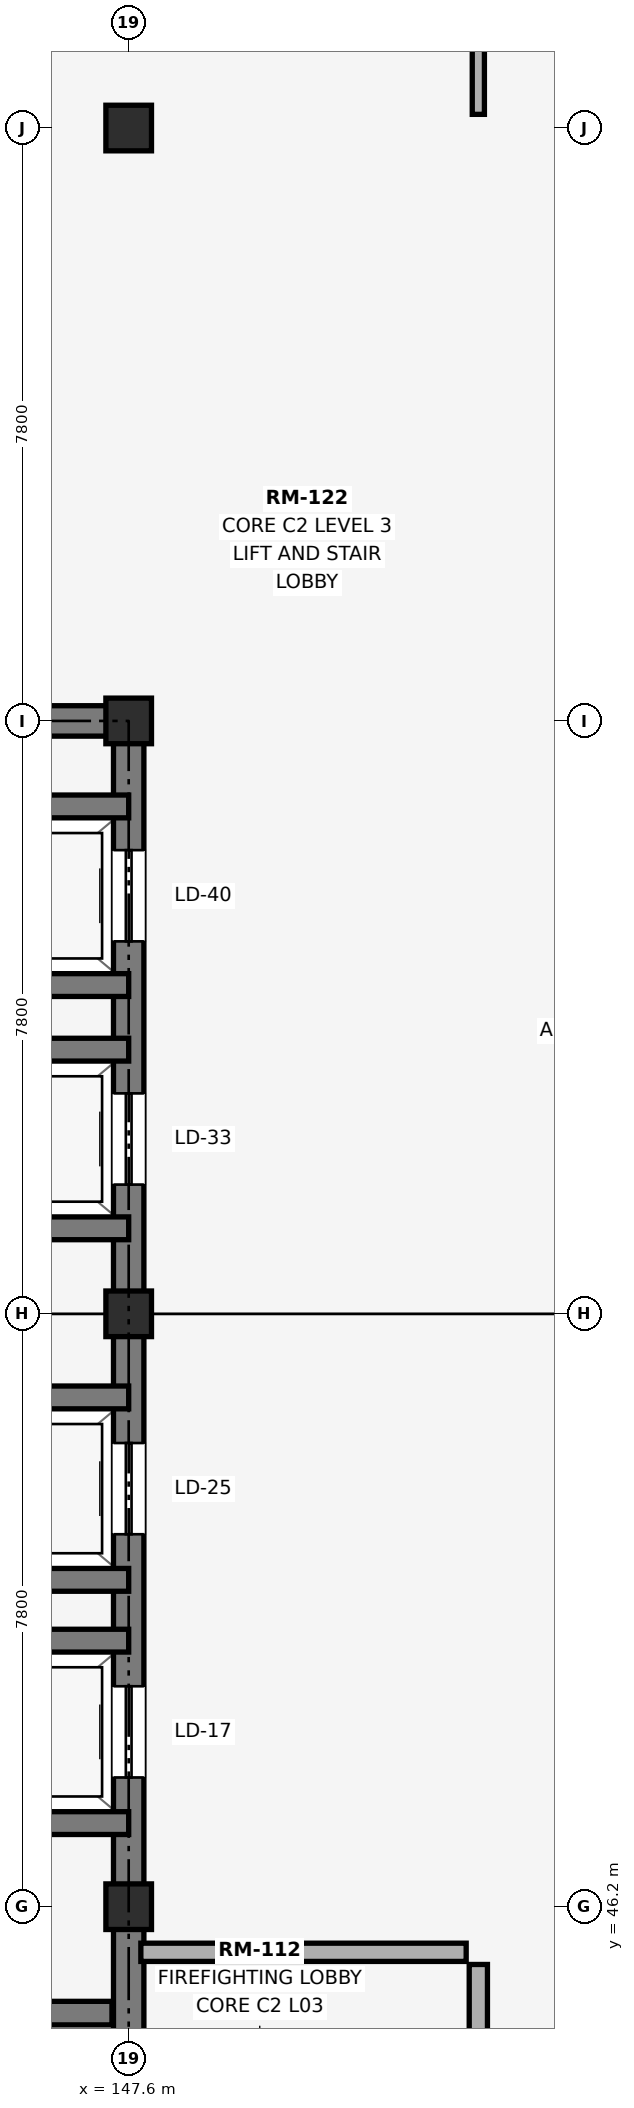
"""IFC4 building model, lengths in metres.
Left out: names, types, materials, properties, quantities, classifications, styles, units other than length and angle.
Written with IfcOpenShell. Run it as: python <this file> out.ifc"""

import sys

from ifc_helpers import new_model, si_unit, direction, frame, frame_2d, origin, origin_2d, place, context, subcontext, project, spatial, rectangle, extrude, element, fill, save


model = new_model("IFC4")
c1 = context("Model", 3, precision=1e-05, world=origin(), true_north=direction((0.0, 1.0)))
c2 = subcontext(c1, "Body", "Model", "MODEL_VIEW")
j1 = project(units=[si_unit("LENGTHUNIT", "METRE"), si_unit("PLANEANGLEUNIT", "RADIAN")], contexts=[c1])
p1 = place(None, origin())
s1 = spatial("IfcSite", under=j1, at=p1, CompositionType="ELEMENT")
p2 = place(p1, origin())
s2 = spatial("IfcBuilding", under=s1, at=p2, CompositionType="ELEMENT")
p3 = place(p2, frame((0.0, 0.0, 15.0)))
s3 = spatial("IfcBuildingStorey", under=s2, at=p3, CompositionType="ELEMENT", Elevation=15.0)
for number, where, z_axis, x_axis in (
    (1, (147.6, 46.2, 0.0), (0.0, 0.0, 1.0), (1.0, 0.0, 0.0)),
    (2, (147.6, 54.0, 0.0), (0.0, 0.0, 1.0), (1.0, 0.0, 0.0)),
    (3, (147.6, 61.8, 0.0), (0.0, 0.0, 1.0), (1.0, 0.0, 0.0)),
    (4, (147.6, 69.6, 0.0), (0.0, 0.0, 1.0), (1.0, 0.0, 0.0)),
):
    element("IfcColumn", number, at=place(p3, frame(where, z_axis=z_axis, x_axis=x_axis)), inside=s3, PredefinedType="COLUMN", context=c2, shape_type="SweptSolid", body=[
        extrude(rectangle(XDim=0.6, YDim=0.6, at=origin_2d()), origin(), (0.0, 0.0, 1.0), 4.5),
    ])
p4 = place(p3, frame((137.8, 61.8, 0.0), z_axis=(0.0, 0.0, 1.0), x_axis=(1.0, 0.0, 0.0)))
e5 = element("IfcWall", 5, at=p4, inside=s3, PredefinedType="SHEAR", context=c2, shape_type="SweptSolid", body=[
    extrude(rectangle(XDim=10.0, YDim=0.4, at=frame_2d((5.0, 0.0))), origin(), (0.0, 0.0, 1.0), 4.5),
])
p5 = place(p3, frame((147.6, 38.6, 0.0), z_axis=(0.0, 0.0, 1.0), x_axis=(0.0, 1.0, 0.0)))
e6 = element("IfcWall", 6, at=p5, inside=s3, PredefinedType="SHEAR", context=c2, shape_type="SweptSolid", body=[
    extrude(rectangle(XDim=23.0, YDim=0.4, at=frame_2d((11.5, 0.0))), origin(), (0.0, 0.0, 1.0), 4.5),
])
p6 = place(p5, frame((9.3, 0.0, 0.0)))
e7 = element("IfcOpeningElement", 7, at=p6, cuts=e6, PredefinedType="OPENING", context=c2, shape_type="SweptSolid", body=[
    extrude(rectangle(XDim=1.2, YDim=2.2, at=frame_2d((0.6, 1.1))), frame((0.0, 0.21, 0.0), z_axis=(0.0, -1.0, 0.0), x_axis=(1.0, 0.0, 0.0)), (0.0, 0.0, 1.0), 0.42),
])
p7 = place(p5, frame((12.5, 0.0, 0.0)))
e8 = element("IfcOpeningElement", 8, at=p7, cuts=e6, PredefinedType="OPENING", context=c2, shape_type="SweptSolid", body=[
    extrude(rectangle(XDim=1.2, YDim=2.2, at=frame_2d((0.6, 1.1))), frame((0.0, 0.21, 0.0), z_axis=(0.0, -1.0, 0.0), x_axis=(1.0, 0.0, 0.0)), (0.0, 0.0, 1.0), 0.42),
])
p8 = place(p5, frame((17.1, 0.0, 0.0)))
e9 = element("IfcOpeningElement", 9, at=p8, cuts=e6, PredefinedType="OPENING", context=c2, shape_type="SweptSolid", body=[
    extrude(rectangle(XDim=1.2, YDim=2.2, at=frame_2d((0.6, 1.1))), frame((0.0, 0.21, 0.0), z_axis=(0.0, -1.0, 0.0), x_axis=(1.0, 0.0, 0.0)), (0.0, 0.0, 1.0), 0.42),
])
p9 = place(p5, frame((20.3, 0.0, 0.0)))
e10 = element("IfcOpeningElement", 10, at=p9, cuts=e6, PredefinedType="OPENING", context=c2, shape_type="SweptSolid", body=[
    extrude(rectangle(XDim=1.2, YDim=2.2, at=frame_2d((0.6, 1.1))), frame((0.0, 0.21, 0.0), z_axis=(0.0, -1.0, 0.0), x_axis=(1.0, 0.0, 0.0)), (0.0, 0.0, 1.0), 0.42),
])
p10 = place(p5, frame((2.4, 0.0, 0.0)))
e11 = element("IfcOpeningElement", 11, at=p10, cuts=e6, PredefinedType="OPENING", context=c2, shape_type="SweptSolid", body=[
    extrude(rectangle(XDim=1.1, YDim=2.2, at=frame_2d((0.55, 1.1))), frame((0.0, 0.21, 0.0), z_axis=(0.0, -1.0, 0.0), x_axis=(1.0, 0.0, 0.0)), (0.0, 0.0, 1.0), 0.42),
])
p11 = place(p3, frame((138.22, 44.8, 0.0), z_axis=(0.0, 0.0, 1.0), x_axis=(1.0, 0.0, 0.0)))
e12 = element("IfcWall", 12, at=p11, inside=s3, PredefinedType="SHEAR", context=c2, shape_type="SweptSolid", body=[
    extrude(rectangle(XDim=9.16, YDim=0.31, at=frame_2d((4.58, 0.0))), origin(), (0.0, 0.0, 1.0), 4.5),
])
for number, where, z_axis, x_axis in (
    (13, (144.75, 47.3, 0.0), (0.0, 0.0, 1.0), (1.0, 0.0, 0.0)),
    (14, (144.75, 49.7, 0.0), (0.0, 0.0, 1.0), (1.0, 0.0, 0.0)),
    (15, (144.75, 50.5, 0.0), (0.0, 0.0, 1.0), (1.0, 0.0, 0.0)),
    (16, (144.75, 52.9, 0.0), (0.0, 0.0, 1.0), (1.0, 0.0, 0.0)),
):
    element("IfcWall", number, at=place(p3, frame(where, z_axis=z_axis, x_axis=x_axis)), inside=s3, PredefinedType="SHEAR", context=c2, shape_type="SweptSolid", body=[
        extrude(rectangle(XDim=2.85, YDim=0.3, at=frame_2d((1.425, 0.0))), origin(), (0.0, 0.0, 1.0), 4.5),
    ])
for number, where, z_axis, x_axis in (
    (17, (144.8, 55.125, 0.0), (0.0, 0.0, 1.0), (1.0, 0.0, 0.0)),
    (18, (144.8, 57.475, 0.0), (0.0, 0.0, 1.0), (1.0, 0.0, 0.0)),
    (19, (144.8, 58.325, 0.0), (0.0, 0.0, 1.0), (1.0, 0.0, 0.0)),
    (20, (144.8, 60.675, 0.0), (0.0, 0.0, 1.0), (1.0, 0.0, 0.0)),
):
    element("IfcWall", number, at=place(p3, frame(where, z_axis=z_axis, x_axis=x_axis)), inside=s3, PredefinedType="SHEAR", context=c2, shape_type="SweptSolid", body=[
        extrude(rectangle(XDim=2.8, YDim=0.3, at=frame_2d((1.4, 0.0))), origin(), (0.0, 0.0, 1.0), 4.5),
    ])
p12 = place(p3, frame((147.76, 45.6, 0.0), z_axis=(0.0, 0.0, 1.0), x_axis=(1.0, 0.0, 0.0)))
e21 = element("IfcWall", 21, at=p12, inside=s3, PredefinedType="PARTITIONING", context=c2, shape_type="SweptSolid", body=[
    extrude(rectangle(XDim=4.28, YDim=0.24, at=frame_2d((2.14, 0.0))), origin(), (0.0, 0.0, 1.0), 4.19),
])
p13 = place(p3, frame((152.2, 38.56, 0.0), z_axis=(0.0, 0.0, 1.0), x_axis=(0.0, 1.0, 0.0)))
e22 = element("IfcWall", 22, at=p13, inside=s3, PredefinedType="PARTITIONING", context=c2, shape_type="SweptSolid", body=[
    extrude(rectangle(XDim=6.88, YDim=0.24, at=frame_2d((3.44, 0.0))), origin(), (0.0, 0.0, 1.0), 4.19),
])
p14 = place(p13, frame((1.9, 0.0, 0.0)))
e23 = element("IfcOpeningElement", 23, at=p14, cuts=e22, PredefinedType="OPENING", context=c2, shape_type="SweptSolid", body=[
    extrude(rectangle(XDim=1.8, YDim=2.3, at=frame_2d((0.9, 1.15))), frame((0.0, 0.13, 0.0), z_axis=(0.0, -1.0, 0.0), x_axis=(1.0, 0.0, 0.0)), (0.0, 0.0, 1.0), 0.26),
])
p15 = place(p3, frame((152.2, 69.78, 0.0), z_axis=(0.0, 0.0, 1.0), x_axis=(0.0, 1.0, 0.0)))
e24 = element("IfcWall", 24, at=p15, inside=s3, PredefinedType="PARTITIONING", context=c2, shape_type="SweptSolid", body=[
    extrude(rectangle(XDim=15.27, YDim=0.16, at=frame_2d((7.635, 0.0))), origin(), (0.0, 0.0, 1.0), 4.19),
])
p16 = place(p15, frame((6.0, 0.0, 0.0)))
e25 = element("IfcOpeningElement", 25, at=p16, cuts=e24, PredefinedType="OPENING", context=c2, shape_type="SweptSolid", body=[
    extrude(rectangle(XDim=0.95, YDim=2.15, at=frame_2d((0.475, 1.075))), frame((0.0, 0.09, 0.0), z_axis=(0.0, -1.0, 0.0), x_axis=(1.0, 0.0, 0.0)), (0.0, 0.0, 1.0), 0.18),
])
p17 = place(p6, origin())
e26 = element("IfcDoor", 26, at=p17, inside=s3, OperationType="SLIDING_TO_LEFT", PredefinedType="DOOR", context=c2, shape_type="SweptSolid", body=[
    extrude(rectangle(XDim=1.2, YDim=2.2, at=frame_2d((0.6, 1.1))), frame((0.0, 0.025, 0.0), z_axis=(0.0, -1.0, 0.0), x_axis=(1.0, 0.0, 0.0)), (0.0, 0.0, 1.0), 0.05),
])
fill(e7, e26)
p18 = place(p7, origin())
e27 = element("IfcDoor", 27, at=p18, inside=s3, OperationType="SLIDING_TO_LEFT", PredefinedType="DOOR", context=c2, shape_type="SweptSolid", body=[
    extrude(rectangle(XDim=1.2, YDim=2.2, at=frame_2d((0.6, 1.1))), frame((0.0, 0.025, 0.0), z_axis=(0.0, -1.0, 0.0), x_axis=(1.0, 0.0, 0.0)), (0.0, 0.0, 1.0), 0.05),
])
fill(e8, e27)
p19 = place(p8, origin())
e28 = element("IfcDoor", 28, at=p19, inside=s3, OperationType="SLIDING_TO_LEFT", PredefinedType="DOOR", context=c2, shape_type="SweptSolid", body=[
    extrude(rectangle(XDim=1.2, YDim=2.2, at=frame_2d((0.6, 1.1))), frame((0.0, 0.025, 0.0), z_axis=(0.0, -1.0, 0.0), x_axis=(1.0, 0.0, 0.0)), (0.0, 0.0, 1.0), 0.05),
])
fill(e9, e28)
p20 = place(p9, origin())
e29 = element("IfcDoor", 29, at=p20, inside=s3, OperationType="SLIDING_TO_RIGHT", PredefinedType="DOOR", context=c2, shape_type="SweptSolid", body=[
    extrude(rectangle(XDim=1.2, YDim=2.2, at=frame_2d((0.6, 1.1))), frame((0.0, 0.025, 0.0), z_axis=(0.0, -1.0, 0.0), x_axis=(1.0, 0.0, 0.0)), (0.0, 0.0, 1.0), 0.05),
])
fill(e10, e29)
save(model, sys.argv[1])
